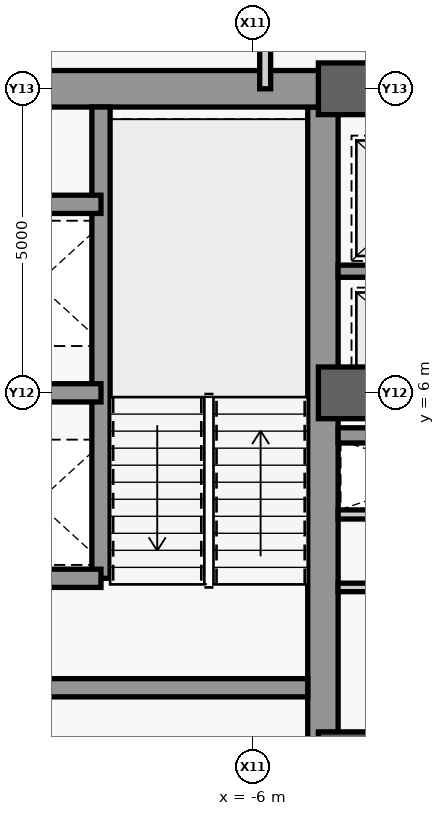
"""IFC4 building model, lengths in metres.
Left out: names, types, materials, properties, quantities, classifications, styles, units other than length and angle.
Written with IfcOpenShell. Run it as: python <this file> out.ifc"""

import sys

from ifc_helpers import new_model, si_unit, direction, frame, frame_2d, origin, origin_2d, place, context, subcontext, project, spatial, rectangle, extrude, source, transform, mapped, element, save


model = new_model("IFC4")
c1 = context("Model", 3, precision=1e-05, world=origin(), true_north=direction((0.0, 1.0)))
c2 = subcontext(c1, "Body", "Model", "MODEL_VIEW")
j1 = project(units=[si_unit("LENGTHUNIT", "METRE"), si_unit("PLANEANGLEUNIT", "RADIAN")], contexts=[c1])
p1 = place(None, origin())
s1 = spatial("IfcSite", under=j1, at=p1, CompositionType="ELEMENT")
p2 = place(p1, origin())
s2 = spatial("IfcBuilding", under=s1, at=p2, CompositionType="ELEMENT")
p3 = place(p2, frame((0.0, 0.0, 235.1)))
s3 = spatial("IfcBuildingStorey", under=s2, at=p3, CompositionType="ELEMENT", Elevation=235.1)
m1 = source(origin(), c2, "Body", "SweptSolid", [
    extrude(rectangle(XDim=21.4, YDim=0.5, at=frame_2d((10.7, 0.0))), origin(), (0.0, 0.0, 1.0), 3.78),
])
p4 = place(p3, frame((-4.85, -10.7, 0.0), z_axis=(0.0, 0.0, 1.0), x_axis=(0.0, 1.0, 0.0)))
e1 = element("IfcWall", 1, at=p4, inside=s3, PredefinedType="SHEAR", context=c2, shape_type="MappedRepresentation", body=[
    mapped(m1, transform((0.0, 0.0, 0.0), scale=1.0)),
])
m2 = source(origin(), c2, "Body", "SweptSolid", [
    extrude(rectangle(XDim=5.9, YDim=0.6, at=frame_2d((2.95, 0.0))), origin(), (0.0, 0.0, 1.0), 3.78),
])
p5 = place(p3, frame((-10.75, 11.0, 0.0), z_axis=(0.0, 0.0, 1.0), x_axis=(1.0, 0.0, 0.0)))
e2 = element("IfcWall", 2, at=p5, inside=s3, PredefinedType="SHEAR", context=c2, shape_type="MappedRepresentation", body=[
    mapped(m2, transform((0.0, 0.0, 0.0), scale=1.0)),
])
m3 = source(origin(), c2, "Body", "SweptSolid", [
    extrude(rectangle(XDim=5.65, YDim=0.3, at=frame_2d((2.825, 0.0))), origin(), (0.0, 0.0, 1.0), 3.78),
])
p6 = place(p3, frame((-10.75, 1.15, 0.0), z_axis=(0.0, 0.0, 1.0), x_axis=(1.0, 0.0, 0.0)))
e3 = element("IfcWall", 3, at=p6, inside=s3, PredefinedType="SHEAR", context=c2, shape_type="MappedRepresentation", body=[
    mapped(m3, transform((0.0, 0.0, 0.0), scale=1.0)),
])
m4 = source(origin(), c2, "Body", "SweptSolid", [
    extrude(rectangle(XDim=9.2, YDim=0.5, at=frame_2d((4.6, 0.0))), origin(), (0.0, 0.0, 1.0), 3.78),
])
p7 = place(p3, frame((-4.6, 11.0, 0.0), z_axis=(0.0, 0.0, 1.0), x_axis=(1.0, 0.0, 0.0)))
e4 = element("IfcWall", 4, at=p7, inside=s3, PredefinedType="SHEAR", context=c2, shape_type="MappedRepresentation", body=[
    mapped(m4, transform((0.0, 0.0, 0.0), scale=1.0)),
])
m5 = source(origin(), c2, "Body", "SweptSolid", [
    extrude(rectangle(XDim=1.8, YDim=2.25, at=frame_2d((0.9, 1.125))), frame((0.0, 0.26, 0.0), z_axis=(0.0, -1.0, 0.0), x_axis=(1.0, 0.0, 0.0)), (0.0, 0.0, 1.0), 0.52),
])
p8 = place(p7, frame((3.7, 0.0, 0.0)))
e5 = element("IfcOpeningElement", 5, at=p8, cuts=e4, PredefinedType="OPENING", context=c2, shape_type="MappedRepresentation", body=[
    mapped(m5, transform((0.0, 0.0, 0.0), scale=1.0)),
])
m6 = source(origin(), c2, "Body", "SweptSolid", [
    extrude(rectangle(XDim=0.85, YDim=0.85, at=origin_2d()), origin(), (0.0, 0.0, 1.0), 4.0),
])
for number, where, z_axis, x_axis in (
    (6, (-4.5, 0.0, 0.0), (0.0, 0.0, 1.0), (1.0, 0.0, 0.0)),
    (7, (-4.5, 6.0, 0.0), (0.0, 0.0, 1.0), (1.0, 0.0, 0.0)),
    (8, (-4.5, 11.0, 0.0), (0.0, 0.0, 1.0), (1.0, 0.0, 0.0)),
):
    element("IfcColumn", number, at=place(p3, frame(where, z_axis=z_axis, x_axis=x_axis)), inside=s3, PredefinedType="COLUMN", context=c2, shape_type="MappedRepresentation", body=[
        mapped(m6, transform((0.0, 0.0, 0.0), scale=1.0)),
    ])
m7 = source(origin(), c2, "Body", "SweptSolid", [
    extrude(rectangle(XDim=7.75, YDim=0.3, at=frame_2d((3.875, 0.0))), origin(), (0.0, 0.0, 1.0), 3.78),
])
p9 = place(p3, frame((-8.5, 2.95, 0.0), z_axis=(0.0, 0.0, 1.0), x_axis=(0.0, 1.0, 0.0)))
e9 = element("IfcWall", 9, at=p9, inside=s3, PredefinedType="SHEAR", context=c2, shape_type="MappedRepresentation", body=[
    mapped(m7, transform((0.0, 0.0, 0.0), scale=1.0)),
])
m8 = source(origin(), c2, "Body", "SweptSolid", [
    extrude(rectangle(XDim=2.2, YDim=0.3, at=frame_2d((1.1, 0.0))), origin(), (0.0, 0.0, 1.0), 3.78),
])
for number, where, z_axis, x_axis in (
    (10, (-10.7, 2.95, 0.0), (0.0, 0.0, 1.0), (1.0, 0.0, 0.0)),
    (11, (-10.7, 6.0, 0.0), (0.0, 0.0, 1.0), (1.0, 0.0, 0.0)),
    (12, (-10.7, 9.1, 0.0), (0.0, 0.0, 1.0), (1.0, 0.0, 0.0)),
):
    element("IfcWall", number, at=place(p3, frame(where, z_axis=z_axis, x_axis=x_axis)), inside=s3, PredefinedType="SHEAR", context=c2, shape_type="MappedRepresentation", body=[
        mapped(m8, transform((0.0, 0.0, 0.0), scale=1.0)),
    ])
m9 = source(origin(), c2, "Body", "SweptSolid", [
    extrude(rectangle(XDim=3.45, YDim=0.15, at=frame_2d((1.725, 0.0))), origin(), (0.0, 0.0, 1.0), 3.78),
])
p10 = place(p3, frame((-4.6, 4.0, 0.0), z_axis=(0.0, 0.0, 1.0), x_axis=(1.0, 0.0, 0.0)))
e13 = element("IfcWall", 13, at=p10, inside=s3, PredefinedType="PARTITIONING", context=c2, shape_type="MappedRepresentation", body=[
    mapped(m9, transform((0.0, 0.0, 0.0), scale=1.0)),
])
m10 = source(origin(), c2, "Body", "SweptSolid", [
    extrude(rectangle(XDim=2.45, YDim=0.2, at=frame_2d((1.225, 0.0))), origin(), (0.0, 0.0, 1.0), 3.78),
])
p11 = place(p3, frame((-4.6, 8.0, 0.0), z_axis=(0.0, 0.0, 1.0), x_axis=(1.0, 0.0, 0.0)))
e14 = element("IfcWall", 14, at=p11, inside=s3, PredefinedType="SHEAR", context=c2, shape_type="MappedRepresentation", body=[
    mapped(m10, transform((0.0, 0.0, 0.0), scale=1.0)),
])
m11 = source(origin(), c2, "Body", "SweptSolid", [
    extrude(rectangle(XDim=9.2, YDim=0.25, at=frame_2d((4.6, 0.0))), origin(), (0.0, 0.0, 1.0), 3.78),
])
p12 = place(p3, frame((-4.6, 5.3, 0.0), z_axis=(0.0, 0.0, 1.0), x_axis=(1.0, 0.0, 0.0)))
e15 = element("IfcWall", 15, at=p12, inside=s3, PredefinedType="SHEAR", context=c2, shape_type="MappedRepresentation", body=[
    mapped(m11, transform((0.0, 0.0, 0.0), scale=1.0)),
])
m12 = source(origin(), c2, "Body", "SweptSolid", [
    extrude(rectangle(XDim=1.05, YDim=2.2, at=frame_2d((0.525, 1.1))), frame((0.0, 0.135, 0.0), z_axis=(0.0, -1.0, 0.0), x_axis=(1.0, 0.0, 0.0)), (0.0, 0.0, 1.0), 0.27),
])
p13 = place(p12, frame((4.075, 0.0, 0.0)))
e16 = element("IfcOpeningElement", 16, at=p13, cuts=e15, PredefinedType="OPENING", context=c2, shape_type="MappedRepresentation", body=[
    mapped(m12, transform((0.0, 0.0, 0.0), scale=1.0)),
])
m13 = source(origin(), c2, "Body", "SweptSolid", [
    extrude(rectangle(XDim=3.45, YDim=0.14, at=frame_2d((1.725, 0.0))), origin(), (0.0, 0.0, 1.0), 3.78),
])
p14 = place(p3, frame((-4.6, 2.8, 0.0), z_axis=(0.0, 0.0, 1.0), x_axis=(1.0, 0.0, 0.0)))
e17 = element("IfcWall", 17, at=p14, inside=s3, PredefinedType="PARTITIONING", context=c2, shape_type="MappedRepresentation", body=[
    mapped(m13, transform((0.0, 0.0, 0.0), scale=1.0)),
])
m14 = source(origin(), c2, "Body", "SweptSolid", [
    extrude(rectangle(XDim=2.5, YDim=0.18, at=frame_2d((1.25, 0.0))), origin(), (0.0, 0.0, 1.0), 3.085),
])
p15 = place(p3, frame((-5.8, 11.0, 0.0), z_axis=(0.0, 0.0, 1.0), x_axis=(0.0, 1.0, 0.0)))
e18 = element("IfcWall", 18, at=p15, inside=s3, PredefinedType="PARTITIONING", context=c2, shape_type="MappedRepresentation", body=[
    mapped(m14, transform((0.0, 0.0, 0.0), scale=1.0)),
])
save(model, sys.argv[1])
